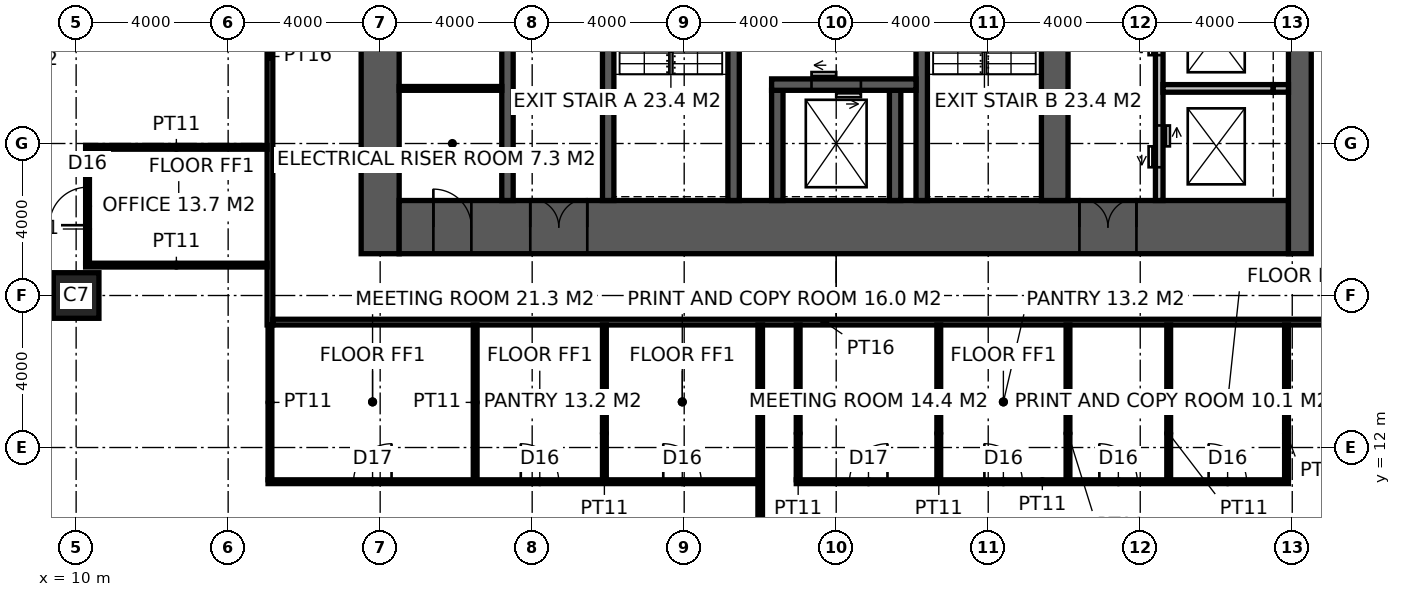
"""IFC4 building model, lengths in metres.
Left out: names, types, materials, properties, quantities, classifications, styles, units other than length and angle.
Written with IfcOpenShell. Run it as: python <this file> out.ifc"""

import sys

from ifc_helpers import new_model, si_unit, direction, frame, frame_2d, origin, origin_2d, place, context, subcontext, project, spatial, rectangle, hollow_rectangle, extrude, element, fill, save


model = new_model("IFC4")
c1 = context("Model", 3, precision=1e-05, world=origin(), true_north=direction((0.0, 1.0)))
c2 = subcontext(c1, "Body", "Model", "MODEL_VIEW")
j1 = project(units=[si_unit("LENGTHUNIT", "METRE"), si_unit("PLANEANGLEUNIT", "RADIAN")], contexts=[c1])
p1 = place(None, origin())
s1 = spatial("IfcSite", under=j1, at=p1, CompositionType="ELEMENT")
p2 = place(p1, origin())
s2 = spatial("IfcBuilding", under=s1, at=p2, CompositionType="ELEMENT")
p3 = place(p2, frame((0.0, 0.0, 51.0)))
s3 = spatial("IfcBuildingStorey", under=s2, at=p3, CompositionType="ELEMENT", Elevation=51.0)
p4 = place(p3, frame((10.0, 16.0, 0.0), z_axis=(0.0, 0.0, 1.0), x_axis=(1.0, 0.0, 0.0)))
e1 = element("IfcColumn", 1, at=p4, inside=s3, PredefinedType="COLUMN", context=c2, shape_type="SweptSolid", body=[
    extrude(hollow_rectangle(XDim=1.2, YDim=1.2, WallThickness=0.1, at=origin_2d()), origin(), (0.0, 0.0, 1.0), 4.0),
])
p5 = place(p3, frame((18.0, 17.1, -0.15), z_axis=(0.0, 0.0, 1.0), x_axis=(0.0, 1.0, 0.0)))
e2 = element("IfcWall", 2, at=p5, inside=s3, PredefinedType="SHEAR", context=c2, shape_type="SweptSolid", body=[
    extrude(rectangle(XDim=19.8, YDim=1.0, at=frame_2d((9.9, 0.0))), origin(), (0.0, 0.0, 1.0), 4.0),
])
p6 = place(p3, frame((18.5, 17.8, -0.15), z_axis=(0.0, 0.0, 1.0), x_axis=(1.0, 0.0, 0.0)))
e3 = element("IfcWall", 3, at=p6, inside=s3, PredefinedType="SHEAR", context=c2, shape_type="SweptSolid", body=[
    extrude(rectangle(XDim=23.4, YDim=1.4, at=frame_2d((11.7, 0.0))), origin(), (0.0, 0.0, 1.0), 4.0),
])
p7 = place(p6, frame((3.45, 0.0, 0.15)))
e4 = element("IfcOpeningElement", 4, at=p7, cuts=e3, PredefinedType="OPENING", context=c2, shape_type="SweptSolid", body=[
    extrude(rectangle(XDim=1.5, YDim=2.4, at=frame_2d((0.75, 1.2))), frame((0.0, 0.71, 0.0), z_axis=(0.0, -1.0, 0.0), x_axis=(1.0, 0.0, 0.0)), (0.0, 0.0, 1.0), 1.42),
])
p8 = place(p6, frame((17.9, 0.0, 0.15)))
e5 = element("IfcOpeningElement", 5, at=p8, cuts=e3, PredefinedType="OPENING", context=c2, shape_type="SweptSolid", body=[
    extrude(rectangle(XDim=1.5, YDim=2.4, at=frame_2d((0.75, 1.2))), frame((0.0, 0.71, 0.0), z_axis=(0.0, -1.0, 0.0), x_axis=(1.0, 0.0, 0.0)), (0.0, 0.0, 1.0), 1.42),
])
p9 = place(p6, frame((0.9, 0.0, 0.15)))
e6 = element("IfcOpeningElement", 6, at=p9, cuts=e3, PredefinedType="OPENING", context=c2, shape_type="SweptSolid", body=[
    extrude(rectangle(XDim=1.0, YDim=2.2, at=frame_2d((0.5, 1.1))), frame((0.0, 0.71, 0.0), z_axis=(0.0, -1.0, 0.0), x_axis=(1.0, 0.0, 0.0)), (0.0, 0.0, 1.0), 1.42),
])
p10 = place(p3, frame((42.2, 17.1, -0.15), z_axis=(0.0, 0.0, 1.0), x_axis=(0.0, 1.0, 0.0)))
e7 = element("IfcWall", 7, at=p10, inside=s3, PredefinedType="SHEAR", context=c2, shape_type="SweptSolid", body=[
    extrude(rectangle(XDim=19.8, YDim=0.6, at=frame_2d((9.9, 0.0))), origin(), (0.0, 0.0, 1.0), 4.0),
])
p11 = place(p3, frame((35.75, 18.5, -0.15), z_axis=(0.0, 0.0, 1.0), x_axis=(0.0, 1.0, 0.0)))
e8 = element("IfcWall", 8, at=p11, inside=s3, PredefinedType="SHEAR", context=c2, shape_type="SweptSolid", body=[
    extrude(rectangle(XDim=17.0, YDim=0.7, at=frame_2d((8.5, 0.0))), origin(), (0.0, 0.0, 1.0), 4.0),
])
p12 = place(p11, frame((9.85, 0.0, 0.15)))
e9 = element("IfcOpeningElement", 9, at=p12, cuts=e8, PredefinedType="OPENING", context=c2, shape_type="SweptSolid", body=[
    extrude(rectangle(XDim=1.0, YDim=2.2, at=frame_2d((0.5, 1.1))), frame((0.0, 0.36, 0.0), z_axis=(0.0, -1.0, 0.0), x_axis=(1.0, 0.0, 0.0)), (0.0, 0.0, 1.0), 0.72),
])
p13 = place(p3, frame((24.0, 18.5, -0.15), z_axis=(0.0, 0.0, 1.0), x_axis=(0.0, 1.0, 0.0)))
e10 = element("IfcWall", 10, at=p13, inside=s3, PredefinedType="SHEAR", context=c2, shape_type="SweptSolid", body=[
    extrude(rectangle(XDim=17.0, YDim=0.3, at=frame_2d((8.5, 0.0))), origin(), (0.0, 0.0, 1.0), 4.0),
])
p14 = place(p13, frame((9.6, 0.0, 0.15)))
e11 = element("IfcOpeningElement", 11, at=p14, cuts=e10, PredefinedType="OPENING", context=c2, shape_type="SweptSolid", body=[
    extrude(rectangle(XDim=1.5, YDim=2.4, at=frame_2d((0.75, 1.2))), frame((0.0, 0.16, 0.0), z_axis=(0.0, -1.0, 0.0), x_axis=(1.0, 0.0, 0.0)), (0.0, 0.0, 1.0), 0.32),
])
p15 = place(p3, frame((27.3, 18.5, -0.15), z_axis=(0.0, 0.0, 1.0), x_axis=(0.0, 1.0, 0.0)))
e12 = element("IfcWall", 12, at=p15, inside=s3, PredefinedType="SHEAR", context=c2, shape_type="SweptSolid", body=[
    extrude(rectangle(XDim=7.9, YDim=0.3, at=frame_2d((3.95, 0.0))), origin(), (0.0, 0.0, 1.0), 4.0),
])
p16 = place(p15, frame((6.4, 0.0, 0.15)))
e13 = element("IfcOpeningElement", 13, at=p16, cuts=e12, PredefinedType="OPENING", context=c2, shape_type="SweptSolid", body=[
    extrude(rectangle(XDim=1.0, YDim=2.2, at=frame_2d((0.5, 1.1))), frame((0.0, 0.16, 0.0), z_axis=(0.0, -1.0, 0.0), x_axis=(1.0, 0.0, 0.0)), (0.0, 0.0, 1.0), 0.32),
])
p17 = place(p3, frame((32.25, 18.5, -0.15), z_axis=(0.0, 0.0, 1.0), x_axis=(0.0, 1.0, 0.0)))
e14 = element("IfcWall", 14, at=p17, inside=s3, PredefinedType="SHEAR", context=c2, shape_type="SweptSolid", body=[
    extrude(rectangle(XDim=7.9, YDim=0.3, at=frame_2d((3.95, 0.0))), origin(), (0.0, 0.0, 1.0), 4.0),
])
for number, where, z_axis, x_axis in (
    (15, (28.45, 18.5, -0.15), (0.0, 0.0, 1.0), (0.0, 1.0, 0.0)),
    (16, (31.55, 18.5, -0.15), (0.0, 0.0, 1.0), (0.0, 1.0, 0.0)),
):
    element("IfcWall", number, at=place(p3, frame(where, z_axis=z_axis, x_axis=x_axis)), inside=s3, PredefinedType="SHEAR", context=c2, shape_type="SweptSolid", body=[
        extrude(rectangle(XDim=2.9, YDim=0.3, at=frame_2d((1.45, 0.0))), origin(), (0.0, 0.0, 1.0), 4.0),
    ])
p18 = place(p3, frame((28.3, 21.55, -0.15), z_axis=(0.0, 0.0, 1.0), x_axis=(1.0, 0.0, 0.0)))
e17 = element("IfcWall", 17, at=p18, inside=s3, PredefinedType="SHEAR", context=c2, shape_type="SweptSolid", body=[
    extrude(rectangle(XDim=3.8, YDim=0.3, at=frame_2d((1.9, 0.0))), origin(), (0.0, 0.0, 1.0), 4.0),
])
p19 = place(p18, frame((1.05, 0.0, 0.15)))
e18 = element("IfcOpeningElement", 18, at=p19, cuts=e17, PredefinedType="OPENING", context=c2, shape_type="SweptSolid", body=[
    extrude(rectangle(XDim=1.3, YDim=2.4, at=frame_2d((0.65, 1.2))), frame((0.0, 0.16, 0.0), z_axis=(0.0, -1.0, 0.0), x_axis=(1.0, 0.0, 0.0)), (0.0, 0.0, 1.0), 0.32),
])
p20 = place(p3, frame((21.35, 18.5, -0.15), z_axis=(0.0, 0.0, 1.0), x_axis=(0.0, 1.0, 0.0)))
e19 = element("IfcWall", 19, at=p20, inside=s3, PredefinedType="SHEAR", context=c2, shape_type="SweptSolid", body=[
    extrude(rectangle(XDim=12.5, YDim=0.3, at=frame_2d((6.25, 0.0))), origin(), (0.0, 0.0, 1.0), 4.0),
])
p21 = place(p20, frame((6.725, 0.0, 0.15)))
e20 = element("IfcOpeningElement", 20, at=p21, cuts=e19, PredefinedType="OPENING", context=c2, shape_type="SweptSolid", body=[
    extrude(rectangle(XDim=1.0, YDim=2.2, at=frame_2d((0.5, 1.1))), frame((0.0, 0.16, 0.0), z_axis=(0.0, -1.0, 0.0), x_axis=(1.0, 0.0, 0.0)), (0.0, 0.0, 1.0), 0.32),
])
p22 = place(p3, frame((38.5, 18.5, -0.15), z_axis=(0.0, 0.0, 1.0), x_axis=(0.0, 1.0, 0.0)))
e21 = element("IfcWall", 21, at=p22, inside=s3, PredefinedType="SOLIDWALL", context=c2, shape_type="SweptSolid", body=[
    extrude(rectangle(XDim=11.5, YDim=0.2, at=frame_2d((5.75, 0.0))), origin(), (0.0, 0.0, 1.0), 4.0),
])
p23 = place(p22, frame((0.875, 0.0, 0.15)))
e22 = element("IfcOpeningElement", 22, at=p23, cuts=e21, PredefinedType="OPENING", context=c2, shape_type="SweptSolid", body=[
    extrude(rectangle(XDim=1.1, YDim=2.2, at=frame_2d((0.55, 1.1))), frame((0.0, 0.11, 0.0), z_axis=(0.0, -1.0, 0.0), x_axis=(1.0, 0.0, 0.0)), (0.0, 0.0, 1.0), 0.22),
])
p24 = place(p22, frame((3.825, 0.0, 0.15)))
e23 = element("IfcOpeningElement", 23, at=p24, cuts=e21, PredefinedType="OPENING", context=c2, shape_type="SweptSolid", body=[
    extrude(rectangle(XDim=1.1, YDim=2.2, at=frame_2d((0.55, 1.1))), frame((0.0, 0.11, 0.0), z_axis=(0.0, -1.0, 0.0), x_axis=(1.0, 0.0, 0.0)), (0.0, 0.0, 1.0), 0.22),
])
p25 = place(p22, frame((6.675, 0.0, 0.15)))
e24 = element("IfcOpeningElement", 24, at=p25, cuts=e21, PredefinedType="OPENING", context=c2, shape_type="SweptSolid", body=[
    extrude(rectangle(XDim=1.1, YDim=2.2, at=frame_2d((0.55, 1.1))), frame((0.0, 0.11, 0.0), z_axis=(0.0, -1.0, 0.0), x_axis=(1.0, 0.0, 0.0)), (0.0, 0.0, 1.0), 0.22),
])
p26 = place(p22, frame((9.575, 0.0, 0.15)))
e25 = element("IfcOpeningElement", 25, at=p26, cuts=e21, PredefinedType="OPENING", context=c2, shape_type="SweptSolid", body=[
    extrude(rectangle(XDim=1.1, YDim=2.2, at=frame_2d((0.55, 1.1))), frame((0.0, 0.11, 0.0), z_axis=(0.0, -1.0, 0.0), x_axis=(1.0, 0.0, 0.0)), (0.0, 0.0, 1.0), 0.22),
])
p27 = place(p3, frame((38.6, 21.45, -0.15), z_axis=(0.0, 0.0, 1.0), x_axis=(1.0, 0.0, 0.0)))
e26 = element("IfcWall", 26, at=p27, inside=s3, PredefinedType="SOLIDWALL", context=c2, shape_type="SweptSolid", body=[
    extrude(rectangle(XDim=2.9, YDim=0.2, at=frame_2d((1.45, 0.0))), origin(), (0.0, 0.0, 1.0), 4.0),
])
p28 = place(p3, frame((41.5, 21.45, -0.15), z_axis=(0.0, 0.0, 1.0), x_axis=(1.0, 0.0, 0.0)))
e27 = element("IfcWall", 27, at=p28, inside=s3, PredefinedType="SOLIDWALL", context=c2, shape_type="SweptSolid", body=[
    extrude(rectangle(XDim=0.4, YDim=0.2, at=frame_2d((0.2, 0.0))), origin(), (0.0, 0.0, 1.0), 4.0),
])
p29 = place(p3, frame((18.5, 21.45, 0.0), z_axis=(0.0, 0.0, 1.0), x_axis=(1.0, 0.0, 0.0)))
e28 = element("IfcWall", 28, at=p29, inside=s3, PredefinedType="PARTITIONING", context=c2, shape_type="SweptSolid", body=[
    extrude(rectangle(XDim=2.7, YDim=0.1, at=frame_2d((1.35, 0.0))), origin(), (0.0, 0.0, 1.0), 3.85),
])
p30 = place(p3, frame((15.1, 15.225, 0.0), z_axis=(0.0, 0.0, 1.0), x_axis=(0.0, 1.0, 0.0)))
e29 = element("IfcWall", 29, at=p30, inside=s3, PredefinedType="PARTITIONING", context=c2, shape_type="SweptSolid", body=[
    extrude(rectangle(XDim=23.55, YDim=0.15, at=frame_2d((11.775, 0.0))), origin(), (0.0, 0.0, 1.0), 3.85),
])
p31 = place(p30, frame((10.875, 0.0, 0.0)))
e30 = element("IfcOpeningElement", 30, at=p31, cuts=e29, PredefinedType="OPENING", context=c2, shape_type="SweptSolid", body=[
    extrude(rectangle(XDim=1.8, YDim=2.4, at=frame_2d((0.9, 1.2))), frame((0.0, 0.085, 0.0), z_axis=(0.0, -1.0, 0.0), x_axis=(1.0, 0.0, 0.0)), (0.0, 0.0, 1.0), 0.17),
])
p32 = place(p3, frame((15.175, 15.3, 0.0), z_axis=(0.0, 0.0, 1.0), x_axis=(1.0, 0.0, 0.0)))
e31 = element("IfcWall", 31, at=p32, inside=s3, PredefinedType="PARTITIONING", context=c2, shape_type="SweptSolid", body=[
    extrude(rectangle(XDim=29.05, YDim=0.15, at=frame_2d((14.525, 0.0))), origin(), (0.0, 0.0, 1.0), 3.85),
])
p33 = place(p3, frame((28.0, 0.3, 0.0), z_axis=(0.0, 0.0, 1.0), x_axis=(0.0, 1.0, 0.0)))
e32 = element("IfcWall", 32, at=p33, inside=s3, PredefinedType="PARTITIONING", context=c2, shape_type="SweptSolid", body=[
    extrude(rectangle(XDim=14.925, YDim=0.12, at=frame_2d((7.462, 0.0))), origin(), (0.0, 0.0, 1.0), 3.85),
])
p34 = place(p3, frame((15.05, 11.1, 0.0), z_axis=(0.0, 0.0, 1.0), x_axis=(1.0, 0.0, 0.0)))
e33 = element("IfcWall", 33, at=p34, inside=s3, PredefinedType="PARTITIONING", context=c2, shape_type="SweptSolid", body=[
    extrude(rectangle(XDim=12.889, YDim=0.1, at=frame_2d((6.444, 0.0))), origin(), (0.0, 0.0, 1.0), 3.85),
])
p35 = place(p34, frame((2.25, 0.0, 0.0)))
e34 = element("IfcOpeningElement", 34, at=p35, cuts=e33, PredefinedType="OPENING", context=c2, shape_type="SweptSolid", body=[
    extrude(rectangle(XDim=1.0, YDim=2.2, at=frame_2d((0.5, 1.1))), frame((0.0, 0.06, 0.0), z_axis=(0.0, -1.0, 0.0), x_axis=(1.0, 0.0, 0.0)), (0.0, 0.0, 1.0), 0.12),
])
p36 = place(p34, frame((6.65, 0.0, 0.0)))
e35 = element("IfcOpeningElement", 35, at=p36, cuts=e33, PredefinedType="OPENING", context=c2, shape_type="SweptSolid", body=[
    extrude(rectangle(XDim=1.0, YDim=2.2, at=frame_2d((0.5, 1.1))), frame((0.0, 0.06, 0.0), z_axis=(0.0, -1.0, 0.0), x_axis=(1.0, 0.0, 0.0)), (0.0, 0.0, 1.0), 0.12),
])
p37 = place(p34, frame((10.399, 0.0, 0.0)))
e36 = element("IfcOpeningElement", 36, at=p37, cuts=e33, PredefinedType="OPENING", context=c2, shape_type="SweptSolid", body=[
    extrude(rectangle(XDim=1.0, YDim=2.2, at=frame_2d((0.5, 1.1))), frame((0.0, 0.06, 0.0), z_axis=(0.0, -1.0, 0.0), x_axis=(1.0, 0.0, 0.0)), (0.0, 0.0, 1.0), 0.12),
])
p38 = place(p3, frame((28.949, 11.1, 0.0), z_axis=(0.0, 0.0, 1.0), x_axis=(1.0, 0.0, 0.0)))
e37 = element("IfcWall", 37, at=p38, inside=s3, PredefinedType="PARTITIONING", context=c2, shape_type="SweptSolid", body=[
    extrude(rectangle(XDim=12.95, YDim=0.1, at=frame_2d((6.475, 0.0))), origin(), (0.0, 0.0, 1.0), 3.85),
])
p39 = place(p38, frame((1.4, 0.0, 0.0)))
e38 = element("IfcOpeningElement", 38, at=p39, cuts=e37, PredefinedType="OPENING", context=c2, shape_type="SweptSolid", body=[
    extrude(rectangle(XDim=1.0, YDim=2.2, at=frame_2d((0.5, 1.1))), frame((0.0, 0.06, 0.0), z_axis=(0.0, -1.0, 0.0), x_axis=(1.0, 0.0, 0.0)), (0.0, 0.0, 1.0), 0.12),
])
p40 = place(p38, frame((4.95, 0.0, 0.0)))
e39 = element("IfcOpeningElement", 39, at=p40, cuts=e37, PredefinedType="OPENING", context=c2, shape_type="SweptSolid", body=[
    extrude(rectangle(XDim=1.0, YDim=2.2, at=frame_2d((0.5, 1.1))), frame((0.0, 0.06, 0.0), z_axis=(0.0, -1.0, 0.0), x_axis=(1.0, 0.0, 0.0)), (0.0, 0.0, 1.0), 0.12),
])
p41 = place(p38, frame((7.975, 0.0, 0.0)))
e40 = element("IfcOpeningElement", 40, at=p41, cuts=e37, PredefinedType="OPENING", context=c2, shape_type="SweptSolid", body=[
    extrude(rectangle(XDim=1.0, YDim=2.2, at=frame_2d((0.5, 1.1))), frame((0.0, 0.06, 0.0), z_axis=(0.0, -1.0, 0.0), x_axis=(1.0, 0.0, 0.0)), (0.0, 0.0, 1.0), 0.12),
])
p42 = place(p38, frame((10.85, 0.0, 0.0)))
e41 = element("IfcOpeningElement", 41, at=p42, cuts=e37, PredefinedType="OPENING", context=c2, shape_type="SweptSolid", body=[
    extrude(rectangle(XDim=1.0, YDim=2.2, at=frame_2d((0.5, 1.1))), frame((0.0, 0.06, 0.0), z_axis=(0.0, -1.0, 0.0), x_axis=(1.0, 0.0, 0.0)), (0.0, 0.0, 1.0), 0.12),
])
p43 = place(p3, frame((10.25, 16.8, 0.0), z_axis=(0.0, 0.0, 1.0), x_axis=(1.0, 0.0, 0.0)))
e42 = element("IfcWall", 42, at=p43, inside=s3, PredefinedType="PARTITIONING", context=c2, shape_type="SweptSolid", body=[
    extrude(rectangle(XDim=4.775, YDim=0.1, at=frame_2d((2.387, 0.0))), origin(), (0.0, 0.0, 1.0), 3.85),
])
p44 = place(p3, frame((10.25, 19.9, 0.0), z_axis=(0.0, 0.0, 1.0), x_axis=(1.0, 0.0, 0.0)))
e43 = element("IfcWall", 43, at=p44, inside=s3, PredefinedType="PARTITIONING", context=c2, shape_type="SweptSolid", body=[
    extrude(rectangle(XDim=4.775, YDim=0.1, at=frame_2d((2.387, 0.0))), origin(), (0.0, 0.0, 1.0), 2.85),
])
p45 = place(p3, frame((10.3, 16.85, 0.0), z_axis=(0.0, 0.0, 1.0), x_axis=(0.0, 1.0, 0.0)))
e44 = element("IfcWall", 44, at=p45, inside=s3, PredefinedType="PARTITIONING", context=c2, shape_type="SweptSolid", body=[
    extrude(rectangle(XDim=3.0, YDim=0.1, at=frame_2d((1.5, 0.0))), origin(), (0.0, 0.0, 1.0), 2.95),
])
p46 = place(p45, frame((1.0, 0.0, 0.0)))
e45 = element("IfcOpeningElement", 45, at=p46, cuts=e44, PredefinedType="OPENING", context=c2, shape_type="SweptSolid", body=[
    extrude(rectangle(XDim=1.0, YDim=2.2, at=frame_2d((0.5, 1.1))), frame((0.0, 0.06, 0.0), z_axis=(0.0, -1.0, 0.0), x_axis=(1.0, 0.0, 0.0)), (0.0, 0.0, 1.0), 0.12),
])
for number, where, z_axis, x_axis in (
    (46, (15.1, 11.15, 0.0), (0.0, 0.0, 1.0), (0.0, 1.0, 0.0)),
    (47, (20.5, 11.15, 0.0), (0.0, 0.0, 1.0), (0.0, 1.0, 0.0)),
    (48, (23.9, 11.15, 0.0), (0.0, 0.0, 1.0), (0.0, 1.0, 0.0)),
    (49, (28.999, 11.15, 0.0), (0.0, 0.0, 1.0), (0.0, 1.0, 0.0)),
    (50, (32.699, 11.15, 0.0), (0.0, 0.0, 1.0), (0.0, 1.0, 0.0)),
    (51, (36.099, 11.15, 0.0), (0.0, 0.0, 1.0), (0.0, 1.0, 0.0)),
    (52, (38.749, 11.15, 0.0), (0.0, 0.0, 1.0), (0.0, 1.0, 0.0)),
):
    element("IfcWall", number, at=place(p3, frame(where, z_axis=z_axis, x_axis=x_axis)), inside=s3, PredefinedType="PARTITIONING", context=c2, shape_type="SweptSolid", body=[
        extrude(rectangle(XDim=4.075, YDim=0.1, at=frame_2d((2.038, 0.0))), origin(), (0.0, 0.0, 1.0), 3.85),
    ])
p47 = place(p3, frame((41.849, 11.15, 0.0), z_axis=(0.0, 0.0, 1.0), x_axis=(0.0, 1.0, 0.0)))
e53 = element("IfcWall", 53, at=p47, inside=s3, PredefinedType="PARTITIONING", context=c2, shape_type="SweptSolid", body=[
    extrude(rectangle(XDim=4.075, YDim=0.1, at=frame_2d((2.038, 0.0))), origin(), (0.0, 0.0, 1.0), 2.95),
])
p48 = place(p7, origin())
e54 = element("IfcDoor", 54, at=p48, inside=s3, OperationType="DOUBLE_DOOR_DOUBLE_SWING", PredefinedType="DOOR", context=c2, shape_type="SweptSolid", body=[
    extrude(rectangle(XDim=1.5, YDim=2.4, at=frame_2d((0.75, 1.2))), frame((0.0, 0.025, 0.0), z_axis=(0.0, -1.0, 0.0), x_axis=(1.0, 0.0, 0.0)), (0.0, 0.0, 1.0), 0.05),
])
fill(e4, e54)
p49 = place(p8, origin())
e55 = element("IfcDoor", 55, at=p49, inside=s3, OperationType="DOUBLE_DOOR_DOUBLE_SWING", PredefinedType="DOOR", context=c2, shape_type="SweptSolid", body=[
    extrude(rectangle(XDim=1.5, YDim=2.4, at=frame_2d((0.75, 1.2))), frame((0.0, 0.025, 0.0), z_axis=(0.0, -1.0, 0.0), x_axis=(1.0, 0.0, 0.0)), (0.0, 0.0, 1.0), 0.05),
])
fill(e5, e55)
p50 = place(p9, origin())
e56 = element("IfcDoor", 56, at=p50, inside=s3, OperationType="SINGLE_SWING_LEFT", PredefinedType="DOOR", context=c2, shape_type="SweptSolid", body=[
    extrude(rectangle(XDim=1.0, YDim=2.2, at=frame_2d((0.5, 1.1))), frame((0.0, 0.025, 0.0), z_axis=(0.0, -1.0, 0.0), x_axis=(1.0, 0.0, 0.0)), (0.0, 0.0, 1.0), 0.05),
])
fill(e6, e56)
p51 = place(p35, origin())
e57 = element("IfcDoor", 57, at=p51, inside=s3, OperationType="SINGLE_SWING_RIGHT", PredefinedType="DOOR", context=c2, shape_type="SweptSolid", body=[
    extrude(rectangle(XDim=1.0, YDim=2.2, at=frame_2d((0.5, 1.1))), frame((0.0, 0.025, 0.0), z_axis=(0.0, -1.0, 0.0), x_axis=(1.0, 0.0, 0.0)), (0.0, 0.0, 1.0), 0.05),
])
fill(e34, e57)
p52 = place(p36, origin())
e58 = element("IfcDoor", 58, at=p52, inside=s3, OperationType="SINGLE_SWING_LEFT", PredefinedType="DOOR", context=c2, shape_type="SweptSolid", body=[
    extrude(rectangle(XDim=1.0, YDim=2.2, at=frame_2d((0.5, 1.1))), frame((0.0, 0.025, 0.0), z_axis=(0.0, -1.0, 0.0), x_axis=(1.0, 0.0, 0.0)), (0.0, 0.0, 1.0), 0.05),
])
fill(e35, e58)
p53 = place(p37, origin())
e59 = element("IfcDoor", 59, at=p53, inside=s3, OperationType="SINGLE_SWING_LEFT", PredefinedType="DOOR", context=c2, shape_type="SweptSolid", body=[
    extrude(rectangle(XDim=1.0, YDim=2.2, at=frame_2d((0.5, 1.1))), frame((0.0, 0.025, 0.0), z_axis=(0.0, -1.0, 0.0), x_axis=(1.0, 0.0, 0.0)), (0.0, 0.0, 1.0), 0.05),
])
fill(e36, e59)
p54 = place(p39, origin())
e60 = element("IfcDoor", 60, at=p54, inside=s3, OperationType="SINGLE_SWING_RIGHT", PredefinedType="DOOR", context=c2, shape_type="SweptSolid", body=[
    extrude(rectangle(XDim=1.0, YDim=2.2, at=frame_2d((0.5, 1.1))), frame((0.0, 0.025, 0.0), z_axis=(0.0, -1.0, 0.0), x_axis=(1.0, 0.0, 0.0)), (0.0, 0.0, 1.0), 0.05),
])
fill(e38, e60)
p55 = place(p40, origin())
e61 = element("IfcDoor", 61, at=p55, inside=s3, OperationType="SINGLE_SWING_LEFT", PredefinedType="DOOR", context=c2, shape_type="SweptSolid", body=[
    extrude(rectangle(XDim=1.0, YDim=2.2, at=frame_2d((0.5, 1.1))), frame((0.0, 0.025, 0.0), z_axis=(0.0, -1.0, 0.0), x_axis=(1.0, 0.0, 0.0)), (0.0, 0.0, 1.0), 0.05),
])
fill(e39, e61)
p56 = place(p41, origin())
e62 = element("IfcDoor", 62, at=p56, inside=s3, OperationType="SINGLE_SWING_LEFT", PredefinedType="DOOR", context=c2, shape_type="SweptSolid", body=[
    extrude(rectangle(XDim=1.0, YDim=2.2, at=frame_2d((0.5, 1.1))), frame((0.0, 0.025, 0.0), z_axis=(0.0, -1.0, 0.0), x_axis=(1.0, 0.0, 0.0)), (0.0, 0.0, 1.0), 0.05),
])
fill(e40, e62)
p57 = place(p42, origin())
e63 = element("IfcDoor", 63, at=p57, inside=s3, OperationType="SINGLE_SWING_LEFT", PredefinedType="DOOR", context=c2, shape_type="SweptSolid", body=[
    extrude(rectangle(XDim=1.0, YDim=2.2, at=frame_2d((0.5, 1.1))), frame((0.0, 0.025, 0.0), z_axis=(0.0, -1.0, 0.0), x_axis=(1.0, 0.0, 0.0)), (0.0, 0.0, 1.0), 0.05),
])
fill(e41, e63)
p58 = place(p46, origin())
e64 = element("IfcDoor", 64, at=p58, inside=s3, OperationType="SINGLE_SWING_LEFT", PredefinedType="DOOR", context=c2, shape_type="SweptSolid", body=[
    extrude(rectangle(XDim=1.0, YDim=2.2, at=frame_2d((0.5, 1.1))), frame((0.0, 0.025, 0.0), z_axis=(0.0, -1.0, 0.0), x_axis=(1.0, 0.0, 0.0)), (0.0, 0.0, 1.0), 0.05),
])
fill(e45, e64)
p59 = place(p19, origin())
e65 = element("IfcDoor", 65, at=p59, inside=s3, OperationType="DOUBLE_DOOR_SLIDING", PredefinedType="DOOR", context=c2, shape_type="SweptSolid", body=[
    extrude(rectangle(XDim=1.3, YDim=2.4, at=frame_2d((0.65, 1.2))), frame((0.0, 0.025, 0.0), z_axis=(0.0, -1.0, 0.0), x_axis=(1.0, 0.0, 0.0)), (0.0, 0.0, 1.0), 0.05),
])
fill(e18, e65)
p60 = place(p23, origin())
e66 = element("IfcDoor", 66, at=p60, inside=s3, OperationType="DOUBLE_DOOR_SLIDING", PredefinedType="DOOR", context=c2, shape_type="SweptSolid", body=[
    extrude(rectangle(XDim=1.1, YDim=2.2, at=frame_2d((0.55, 1.1))), frame((0.0, 0.025, 0.0), z_axis=(0.0, -1.0, 0.0), x_axis=(1.0, 0.0, 0.0)), (0.0, 0.0, 1.0), 0.05),
])
fill(e22, e66)
p61 = place(p24, origin())
e67 = element("IfcDoor", 67, at=p61, inside=s3, OperationType="DOUBLE_DOOR_SLIDING", PredefinedType="DOOR", context=c2, shape_type="SweptSolid", body=[
    extrude(rectangle(XDim=1.1, YDim=2.2, at=frame_2d((0.55, 1.1))), frame((0.0, 0.025, 0.0), z_axis=(0.0, -1.0, 0.0), x_axis=(1.0, 0.0, 0.0)), (0.0, 0.0, 1.0), 0.05),
])
fill(e23, e67)
save(model, sys.argv[1])
